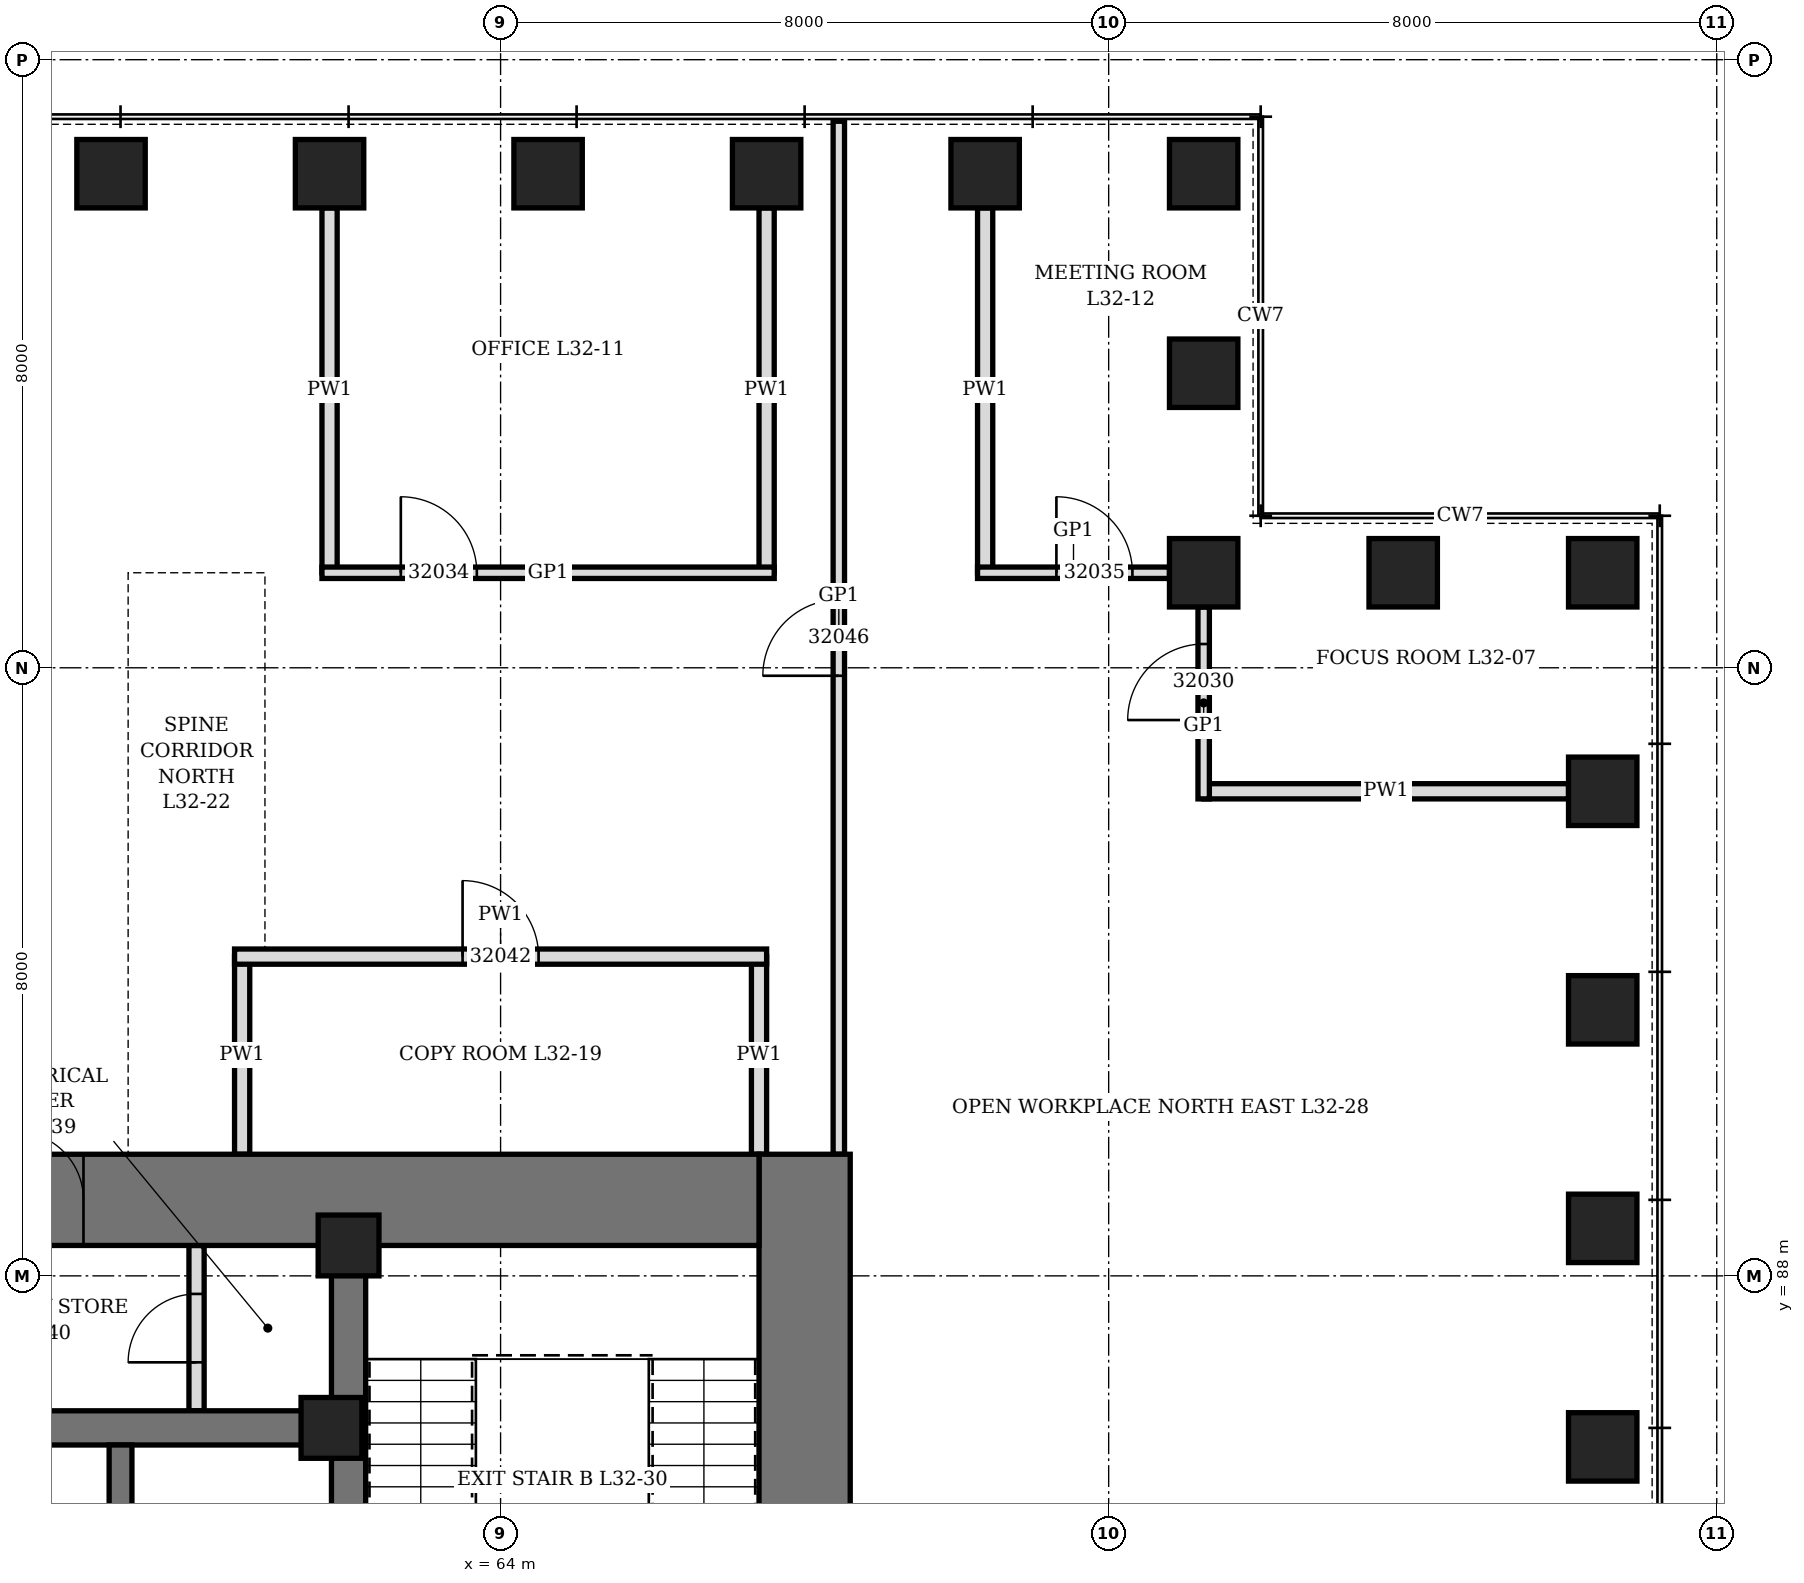
"""IFC4 building model, lengths in metres.
Left out: names, types, materials, properties, quantities, classifications, styles, units other than length and angle.
Written with IfcOpenShell. Run it as: python <this file> out.ifc"""

import sys

from ifc_helpers import new_model, si_unit, direction, frame, frame_2d, origin, origin_2d, place, context, subcontext, project, spatial, rectangle, hollow_rectangle, extrude, element, fill, save


model = new_model("IFC4")
c1 = context("Model", 3, precision=1e-05, world=origin(), true_north=direction((0.0, 1.0)))
c2 = subcontext(c1, "Body", "Model", "MODEL_VIEW")
j1 = project(units=[si_unit("LENGTHUNIT", "METRE"), si_unit("PLANEANGLEUNIT", "RADIAN")], contexts=[c1])
p1 = place(None, origin())
s1 = spatial("IfcSite", under=j1, at=p1, CompositionType="ELEMENT")
p2 = place(p1, origin())
s2 = spatial("IfcBuilding", under=s1, at=p2, CompositionType="ELEMENT")
p3 = place(p2, frame((0.0, 0.0, 145.9)))
s3 = spatial("IfcBuildingStorey", under=s2, at=p3, CompositionType="ELEMENT", Elevation=145.9)
for number, where, z_axis, x_axis in (
    (1, (78.5, 85.75, 0.0), (0.0, 0.0, 1.0), (0.0, 1.0, 0.0)),
    (2, (78.5, 88.625, 0.0), (0.0, 0.0, 1.0), (0.0, 1.0, 0.0)),
    (3, (78.5, 91.5, 0.0), (0.0, 0.0, 1.0), (0.0, 1.0, 0.0)),
    (4, (78.5, 94.375, 0.0), (0.0, 0.0, 1.0), (0.0, 1.0, 0.0)),
    (5, (78.5, 97.25, 0.0), (0.0, 0.0, 1.0), (1.0, 0.0, 0.0)),
    (6, (75.875, 97.25, 0.0), (0.0, 0.0, 1.0), (1.0, 0.0, 0.0)),
    (7, (73.25, 97.25, 0.0), (0.0, 0.0, 1.0), (0.0, 1.0, 0.0)),
    (8, (73.25, 99.875, 0.0), (0.0, 0.0, 1.0), (0.0, 1.0, 0.0)),
    (9, (73.25, 102.5, 0.0), (0.0, 0.0, 1.0), (1.0, 0.0, 0.0)),
    (10, (70.375, 102.5, 0.0), (0.0, 0.0, 1.0), (1.0, 0.0, 0.0)),
    (11, (67.5, 102.5, 0.0), (0.0, 0.0, 1.0), (1.0, 0.0, 0.0)),
    (12, (64.625, 102.5, 0.0), (0.0, 0.0, 1.0), (1.0, 0.0, 0.0)),
    (13, (61.75, 102.5, 0.0), (0.0, 0.0, 1.0), (1.0, 0.0, 0.0)),
    (14, (58.875, 102.5, 0.0), (0.0, 0.0, 1.0), (1.0, 0.0, 0.0)),
):
    element("IfcColumn", number, at=place(p3, frame(where, z_axis=z_axis, x_axis=x_axis)), inside=s3, PredefinedType="COLUMN", context=c2, shape_type="SweptSolid", body=[
        extrude(hollow_rectangle(XDim=0.9, YDim=0.9, WallThickness=0.12, at=origin_2d()), origin(), (0.0, 0.0, 1.0), 4.2),
    ])
p4 = place(p3, frame((68.0, 70.4, 0.0), z_axis=(0.0, 0.0, 1.0), x_axis=(0.0, 1.0, 0.0)))
e15 = element("IfcWall", 15, at=p4, inside=s3, PredefinedType="SHEAR", context=c2, shape_type="SweptSolid", body=[
    extrude(rectangle(XDim=19.2, YDim=1.2, at=frame_2d((9.6, 0.0))), origin(), (0.0, 0.0, 1.0), 4.2),
])
p5 = place(p4, frame((8.6, 0.0, 0.0)))
e16 = element("IfcOpeningElement", 16, at=p5, cuts=e15, PredefinedType="OPENING", context=c2, shape_type="SweptSolid", body=[
    extrude(rectangle(XDim=2.0, YDim=2.4, at=frame_2d((1.0, 1.2))), frame((0.0, 0.61, 0.0), z_axis=(0.0, -1.0, 0.0), x_axis=(1.0, 0.0, 0.0)), (0.0, 0.0, 1.0), 1.22),
])
p6 = place(p3, frame((44.6, 89.0, 0.0), z_axis=(0.0, 0.0, 1.0), x_axis=(1.0, 0.0, 0.0)))
e17 = element("IfcWall", 17, at=p6, inside=s3, PredefinedType="SHEAR", context=c2, shape_type="SweptSolid", body=[
    extrude(rectangle(XDim=22.8, YDim=1.2, at=frame_2d((11.4, 0.0))), origin(), (0.0, 0.0, 1.0), 4.2),
])
p7 = place(p6, frame((7.9, 0.0, 0.0)))
e18 = element("IfcOpeningElement", 18, at=p7, cuts=e17, PredefinedType="OPENING", context=c2, shape_type="SweptSolid", body=[
    extrude(rectangle(XDim=1.0, YDim=2.1, at=frame_2d((0.5, 1.05))), frame((0.0, 0.61, 0.0), z_axis=(0.0, -1.0, 0.0), x_axis=(1.0, 0.0, 0.0)), (0.0, 0.0, 1.0), 1.22),
])
p8 = place(p6, frame((13.012, 0.0, 0.0)))
e19 = element("IfcOpeningElement", 19, at=p8, cuts=e17, PredefinedType="OPENING", context=c2, shape_type="SweptSolid", body=[
    extrude(rectangle(XDim=0.9, YDim=2.1, at=frame_2d((0.45, 1.05))), frame((0.0, 0.61, 0.0), z_axis=(0.0, -1.0, 0.0), x_axis=(1.0, 0.0, 0.0)), (0.0, 0.0, 1.0), 1.22),
])
p9 = place(p3, frame((62.0, 71.6, 0.0), z_axis=(0.0, 0.0, 1.0), x_axis=(0.0, 1.0, 0.0)))
e20 = element("IfcWall", 20, at=p9, inside=s3, PredefinedType="SHEAR", context=c2, shape_type="SweptSolid", body=[
    extrude(rectangle(XDim=16.8, YDim=0.45, at=frame_2d((8.4, 0.0))), origin(), (0.0, 0.0, 1.0), 4.2),
])
p10 = place(p9, frame((7.5, 0.0, 0.0)))
e21 = element("IfcOpeningElement", 21, at=p10, cuts=e20, PredefinedType="OPENING", context=c2, shape_type="SweptSolid", body=[
    extrude(rectangle(XDim=1.8, YDim=2.4, at=frame_2d((0.9, 1.2))), frame((0.0, 0.235, 0.0), z_axis=(0.0, -1.0, 0.0), x_axis=(1.0, 0.0, 0.0)), (0.0, 0.0, 1.0), 0.47),
])
p11 = place(p3, frame((50.225, 86.0, 0.0), z_axis=(0.0, 0.0, 1.0), x_axis=(1.0, 0.0, 0.0)))
e22 = element("IfcWall", 22, at=p11, inside=s3, PredefinedType="SHEAR", context=c2, shape_type="SweptSolid", body=[
    extrude(rectangle(XDim=11.55, YDim=0.45, at=frame_2d((5.775, 0.0))), origin(), (0.0, 0.0, 1.0), 4.2),
])
p12 = place(p3, frame((59.0, 82.225, 0.0), z_axis=(0.0, 0.0, 1.0), x_axis=(0.0, 1.0, 0.0)))
e23 = element("IfcWall", 23, at=p12, inside=s3, PredefinedType="SHEAR", context=c2, shape_type="SweptSolid", body=[
    extrude(rectangle(XDim=3.55, YDim=0.3, at=frame_2d((1.775, 0.0))), origin(), (0.0, 0.0, 1.0), 4.2),
])
for number, where, z_axis, x_axis in (
    (24, (61.775, 86.0, 0.0), (0.0, 0.0, 1.0), (1.0, 0.0, 0.0)),
    (25, (62.0, 88.4, 0.0), (0.0, 0.0, 1.0), (1.0, 0.0, 0.0)),
):
    element("IfcColumn", number, at=place(p3, frame(where, z_axis=z_axis, x_axis=x_axis)), inside=s3, PredefinedType="COLUMN", context=c2, shape_type="SweptSolid", body=[
        extrude(hollow_rectangle(XDim=0.8, YDim=0.8, WallThickness=0.1, at=origin_2d()), origin(), (0.0, 0.0, 1.0), 4.2),
    ])
p13 = place(p3, frame((60.0, 86.225, 0.0), z_axis=(0.0, 0.0, 1.0), x_axis=(0.0, 1.0, 0.0)))
e26 = element("IfcWall", 26, at=p13, inside=s3, PredefinedType="PARTITIONING", context=c2, shape_type="SweptSolid", body=[
    extrude(rectangle(XDim=2.175, YDim=0.2, at=frame_2d((1.087, 0.0))), origin(), (0.0, 0.0, 1.0), 4.04),
])
p14 = place(p13, frame((0.637, 0.0, 0.0)))
e27 = element("IfcOpeningElement", 27, at=p14, cuts=e26, PredefinedType="OPENING", context=c2, shape_type="SweptSolid", body=[
    extrude(rectangle(XDim=0.9, YDim=2.1, at=frame_2d((0.45, 1.05))), frame((0.0, 0.11, 0.0), z_axis=(0.0, -1.0, 0.0), x_axis=(1.0, 0.0, 0.0)), (0.0, 0.0, 1.0), 0.22),
])
p15 = place(p3, frame((73.25, 94.375, 0.0), z_axis=(0.0, 0.0, 1.0), x_axis=(1.0, 0.0, 0.0)))
e28 = element("IfcWall", 28, at=p15, inside=s3, PredefinedType="PARTITIONING", context=c2, shape_type="SweptSolid", body=[
    extrude(rectangle(XDim=4.8, YDim=0.2, at=frame_2d((2.4, 0.0))), origin(), (0.0, 0.0, 1.0), 3.428),
])
p16 = place(p3, frame((61.75, 97.25, 0.0), z_axis=(0.0, 0.0, 1.0), x_axis=(0.0, 1.0, 0.0)))
e29 = element("IfcWall", 29, at=p16, inside=s3, PredefinedType="PARTITIONING", context=c2, shape_type="SweptSolid", body=[
    extrude(rectangle(XDim=4.8, YDim=0.2, at=frame_2d((2.4, 0.0))), origin(), (0.0, 0.0, 1.0), 3.278),
])
p17 = place(p3, frame((67.5, 97.25, 0.0), z_axis=(0.0, 0.0, 1.0), x_axis=(0.0, 1.0, 0.0)))
e30 = element("IfcWall", 30, at=p17, inside=s3, PredefinedType="PARTITIONING", context=c2, shape_type="SweptSolid", body=[
    extrude(rectangle(XDim=4.8, YDim=0.2, at=frame_2d((2.4, 0.0))), origin(), (0.0, 0.0, 1.0), 2.74),
])
p18 = place(p3, frame((70.375, 97.25, 0.0), z_axis=(0.0, 0.0, 1.0), x_axis=(0.0, 1.0, 0.0)))
e31 = element("IfcWall", 31, at=p18, inside=s3, PredefinedType="PARTITIONING", context=c2, shape_type="SweptSolid", body=[
    extrude(rectangle(XDim=4.8, YDim=0.2, at=frame_2d((2.4, 0.0))), origin(), (0.0, 0.0, 1.0), 3.428),
])
p19 = place(p3, frame((60.6, 89.6, 0.0), z_axis=(0.0, 0.0, 1.0), x_axis=(0.0, 1.0, 0.0)))
e32 = element("IfcWall", 32, at=p19, inside=s3, PredefinedType="PARTITIONING", context=c2, shape_type="SweptSolid", body=[
    extrude(rectangle(XDim=2.6, YDim=0.2, at=frame_2d((1.3, 0.0))), origin(), (0.0, 0.0, 1.0), 4.04),
])
p20 = place(p3, frame((67.4, 89.6, 0.0), z_axis=(0.0, 0.0, 1.0), x_axis=(0.0, 1.0, 0.0)))
e33 = element("IfcWall", 33, at=p20, inside=s3, PredefinedType="PARTITIONING", context=c2, shape_type="SweptSolid", body=[
    extrude(rectangle(XDim=2.6, YDim=0.2, at=frame_2d((1.3, 0.0))), origin(), (0.0, 0.0, 1.0), 2.74),
])
p21 = place(p3, frame((60.5, 92.2, 0.0), z_axis=(0.0, 0.0, 1.0), x_axis=(1.0, 0.0, 0.0)))
e34 = element("IfcWall", 34, at=p21, inside=s3, PredefinedType="PARTITIONING", context=c2, shape_type="SweptSolid", body=[
    extrude(rectangle(XDim=7.0, YDim=0.2, at=frame_2d((3.5, 0.0))), origin(), (0.0, 0.0, 1.0), 4.04),
])
p22 = place(p21, frame((3.0, 0.0, 0.0)))
e35 = element("IfcOpeningElement", 35, at=p22, cuts=e34, PredefinedType="OPENING", context=c2, shape_type="SweptSolid", body=[
    extrude(rectangle(XDim=1.0, YDim=2.1, at=frame_2d((0.5, 1.05))), frame((0.0, 0.11, 0.0), z_axis=(0.0, -1.0, 0.0), x_axis=(1.0, 0.0, 0.0)), (0.0, 0.0, 1.0), 0.22),
])
p23 = place(p3, frame((61.65, 97.25, 0.0), z_axis=(0.0, 0.0, 1.0), x_axis=(1.0, 0.0, 0.0)))
e36 = element("IfcWall", 36, at=p23, inside=s3, PredefinedType="PARTITIONING", context=c2, shape_type="SweptSolid", body=[
    extrude(rectangle(XDim=5.95, YDim=0.15, at=frame_2d((2.975, 0.0))), origin(), (0.0, 0.0, 1.0), 4.04),
])
p24 = place(p23, frame((1.038, 0.0, 0.0)))
e37 = element("IfcOpeningElement", 37, at=p24, cuts=e36, PredefinedType="OPENING", context=c2, shape_type="SweptSolid", body=[
    extrude(rectangle(XDim=1.0, YDim=2.1, at=frame_2d((0.5, 1.05))), frame((0.0, 0.085, 0.0), z_axis=(0.0, -1.0, 0.0), x_axis=(1.0, 0.0, 0.0)), (0.0, 0.0, 1.0), 0.17),
])
p25 = place(p3, frame((70.275, 97.25, 0.0), z_axis=(0.0, 0.0, 1.0), x_axis=(1.0, 0.0, 0.0)))
e38 = element("IfcWall", 38, at=p25, inside=s3, PredefinedType="PARTITIONING", context=c2, shape_type="SweptSolid", body=[
    extrude(rectangle(XDim=2.525, YDim=0.15, at=frame_2d((1.263, 0.0))), origin(), (0.0, 0.0, 1.0), 4.04),
])
p26 = place(p25, frame((1.038, 0.0, 0.0)))
e39 = element("IfcOpeningElement", 39, at=p26, cuts=e38, PredefinedType="OPENING", context=c2, shape_type="SweptSolid", body=[
    extrude(rectangle(XDim=1.0, YDim=2.4, at=frame_2d((0.5, 1.2))), frame((0.0, 0.085, 0.0), z_axis=(0.0, -1.0, 0.0), x_axis=(1.0, 0.0, 0.0)), (0.0, 0.0, 1.0), 0.17),
])
p27 = place(p3, frame((68.45, 89.6, 0.0), z_axis=(0.0, 0.0, 1.0), x_axis=(0.0, 1.0, 0.0)))
e40 = element("IfcWall", 40, at=p27, inside=s3, PredefinedType="PARTITIONING", context=c2, shape_type="SweptSolid", body=[
    extrude(rectangle(XDim=13.59, YDim=0.15, at=frame_2d((6.795, 0.0))), origin(), (0.0, 0.0, 1.0), 4.04),
])
p28 = place(p27, frame((6.295, 0.0, 0.0)))
e41 = element("IfcOpeningElement", 41, at=p28, cuts=e40, PredefinedType="OPENING", context=c2, shape_type="SweptSolid", body=[
    extrude(rectangle(XDim=1.0, YDim=2.4, at=frame_2d((0.5, 1.2))), frame((0.0, 0.085, 0.0), z_axis=(0.0, -1.0, 0.0), x_axis=(1.0, 0.0, 0.0)), (0.0, 0.0, 1.0), 0.17),
])
p29 = place(p3, frame((73.25, 94.275, 0.0), z_axis=(0.0, 0.0, 1.0), x_axis=(0.0, 1.0, 0.0)))
e42 = element("IfcWall", 42, at=p29, inside=s3, PredefinedType="PARTITIONING", context=c2, shape_type="SweptSolid", body=[
    extrude(rectangle(XDim=2.525, YDim=0.15, at=frame_2d((1.263, 0.0))), origin(), (0.0, 0.0, 1.0), 4.04),
])
p30 = place(p29, frame((1.038, 0.0, 0.0)))
e43 = element("IfcOpeningElement", 43, at=p30, cuts=e42, PredefinedType="OPENING", context=c2, shape_type="SweptSolid", body=[
    extrude(rectangle(XDim=1.0, YDim=2.4, at=frame_2d((0.5, 1.2))), frame((0.0, 0.085, 0.0), z_axis=(0.0, -1.0, 0.0), x_axis=(1.0, 0.0, 0.0)), (0.0, 0.0, 1.0), 0.17),
])
p31 = place(p8, origin())
e44 = element("IfcDoor", 44, at=p31, inside=s3, OperationType="SINGLE_SWING_LEFT", PredefinedType="DOOR", context=c2, shape_type="SweptSolid", body=[
    extrude(rectangle(XDim=0.9, YDim=2.1, at=frame_2d((0.45, 1.05))), frame((0.0, 0.35, 0.0), z_axis=(0.0, -1.0, 0.0), x_axis=(1.0, 0.0, 0.0)), (0.0, 0.0, 1.0), 0.7),
])
fill(e19, e44)
p32 = place(p14, origin())
e45 = element("IfcDoor", 45, at=p32, inside=s3, OperationType="SINGLE_SWING_LEFT", PredefinedType="DOOR", context=c2, shape_type="SweptSolid", body=[
    extrude(rectangle(XDim=0.9, YDim=2.1, at=frame_2d((0.45, 1.05))), frame((0.0, 0.1, 0.0), z_axis=(0.0, -1.0, 0.0), x_axis=(1.0, 0.0, 0.0)), (0.0, 0.0, 1.0), 0.199),
])
fill(e27, e45)
p33 = place(p30, origin())
e46 = element("IfcDoor", 46, at=p33, inside=s3, OperationType="SINGLE_SWING_RIGHT", PredefinedType="DOOR", context=c2, shape_type="SweptSolid", body=[
    extrude(rectangle(XDim=1.0, YDim=2.4, at=frame_2d((0.5, 1.2))), frame((0.0, 0.075, 0.0), z_axis=(0.0, -1.0, 0.0), x_axis=(1.0, 0.0, 0.0)), (0.0, 0.0, 1.0), 0.149),
])
fill(e43, e46)
p34 = place(p24, origin())
e47 = element("IfcDoor", 47, at=p34, inside=s3, OperationType="SINGLE_SWING_LEFT", PredefinedType="DOOR", context=c2, shape_type="SweptSolid", body=[
    extrude(rectangle(XDim=1.0, YDim=2.1, at=frame_2d((0.5, 1.05))), frame((0.0, 0.075, 0.0), z_axis=(0.0, -1.0, 0.0), x_axis=(1.0, 0.0, 0.0)), (0.0, 0.0, 1.0), 0.149),
])
fill(e37, e47)
p35 = place(p26, origin())
e48 = element("IfcDoor", 48, at=p35, inside=s3, OperationType="SINGLE_SWING_RIGHT", PredefinedType="DOOR", context=c2, shape_type="SweptSolid", body=[
    extrude(rectangle(XDim=1.0, YDim=2.4, at=frame_2d((0.5, 1.2))), frame((0.0, 0.075, 0.0), z_axis=(0.0, -1.0, 0.0), x_axis=(1.0, 0.0, 0.0)), (0.0, 0.0, 1.0), 0.149),
])
fill(e39, e48)
p36 = place(p22, origin())
e49 = element("IfcDoor", 49, at=p36, inside=s3, OperationType="SINGLE_SWING_LEFT", PredefinedType="DOOR", context=c2, shape_type="SweptSolid", body=[
    extrude(rectangle(XDim=1.0, YDim=2.1, at=frame_2d((0.5, 1.05))), frame((0.0, 0.1, 0.0), z_axis=(0.0, -1.0, 0.0), x_axis=(1.0, 0.0, 0.0)), (0.0, 0.0, 1.0), 0.199),
])
fill(e35, e49)
p37 = place(p28, origin())
e50 = element("IfcDoor", 50, at=p37, inside=s3, OperationType="SINGLE_SWING_RIGHT", PredefinedType="DOOR", context=c2, shape_type="SweptSolid", body=[
    extrude(rectangle(XDim=1.0, YDim=2.4, at=frame_2d((0.5, 1.2))), frame((0.0, 0.075, 0.0), z_axis=(0.0, -1.0, 0.0), x_axis=(1.0, 0.0, 0.0)), (0.0, 0.0, 1.0), 0.149),
])
fill(e41, e50)
save(model, sys.argv[1])
